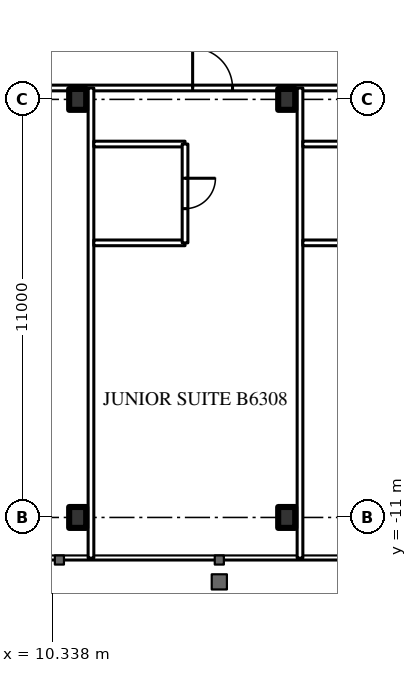
"""IFC4 building model, lengths in metres.
Left out: names, types, materials, properties, quantities, classifications, styles, units other than length and angle.
Written with IfcOpenShell. Run it as: python <this file> out.ifc"""

import sys

from ifc_helpers import new_model, si_unit, direction, frame, frame_2d, origin, origin_2d, place, context, subcontext, project, spatial, rectangle, i_section, extrude, element, fill, save


model = new_model("IFC4")
c1 = context("Model", 3, precision=1e-05, world=origin(), true_north=direction((0.0, 1.0)))
c2 = subcontext(c1, "Body", "Model", "MODEL_VIEW")
j1 = project(units=[si_unit("LENGTHUNIT", "METRE"), si_unit("PLANEANGLEUNIT", "RADIAN")], contexts=[c1])
p1 = place(None, origin())
s1 = spatial("IfcSite", under=j1, at=p1, CompositionType="ELEMENT")
p2 = place(p1, origin())
s2 = spatial("IfcBuilding", under=s1, at=p2, CompositionType="ELEMENT")
p3 = place(p2, frame((0.0, 0.0, 236.9)))
s3 = spatial("IfcBuildingStorey", under=s2, at=p3, CompositionType="ELEMENT", Elevation=236.9)
for number, where, z_axis, x_axis in (
    (1, (11.0, -11.0, 0.0), (0.0, 0.0, 1.0), (1.0, 0.0, 0.0)),
    (2, (16.5, -11.0, 0.0), (0.0, 0.0, 1.0), (1.0, 0.0, 0.0)),
    (3, (11.0, 0.0, 0.0), (0.0, 0.0, 1.0), (1.0, 0.0, 0.0)),
    (4, (16.5, 0.0, 0.0), (0.0, 0.0, 1.0), (1.0, 0.0, 0.0)),
):
    element("IfcColumn", number, at=place(p3, frame(where, z_axis=z_axis, x_axis=x_axis)), inside=s3, PredefinedType="COLUMN", context=c2, shape_type="SweptSolid", body=[
        extrude(i_section(OverallWidth=0.448, OverallDepth=0.55, WebThickness=0.072, FlangeThickness=0.115, FilletRadius=0.02, at=origin_2d()), origin(), (0.0, 0.0, 1.0), 3.6),
    ])
p4 = place(p3, frame((-27.5, 0.3, 0.0), z_axis=(0.0, 0.0, 1.0), x_axis=(1.0, 0.0, 0.0)))
e5 = element("IfcWall", 5, at=p4, inside=s3, PredefinedType="PARTITIONING", context=c2, shape_type="SweptSolid", body=[
    extrude(rectangle(XDim=55.0, YDim=0.15, at=frame_2d((27.5, 0.0))), origin(), (0.0, 0.0, 1.0), 2.4),
])
p5 = place(p4, frame((1.575, 0.0, 0.0)))
e6 = element("IfcOpeningElement", 6, at=p5, cuts=e5, PredefinedType="OPENING", context=c2, shape_type="SweptSolid", body=[
    extrude(rectangle(XDim=1.0, YDim=2.2, at=frame_2d((0.5, 1.1))), frame((0.0, 0.085, 0.0), z_axis=(0.0, -1.0, 0.0), x_axis=(1.0, 0.0, 0.0)), (0.0, 0.0, 1.0), 0.17),
])
p6 = place(p4, frame((8.525, 0.0, 0.0)))
e7 = element("IfcOpeningElement", 7, at=p6, cuts=e5, PredefinedType="OPENING", context=c2, shape_type="SweptSolid", body=[
    extrude(rectangle(XDim=1.05, YDim=2.4, at=frame_2d((0.525, 1.2))), frame((0.0, 0.085, 0.0), z_axis=(0.0, -1.0, 0.0), x_axis=(1.0, 0.0, 0.0)), (0.0, 0.0, 1.0), 0.17),
])
p7 = place(p4, frame((14.025, 0.0, 0.0)))
e8 = element("IfcOpeningElement", 8, at=p7, cuts=e5, PredefinedType="OPENING", context=c2, shape_type="SweptSolid", body=[
    extrude(rectangle(XDim=1.05, YDim=2.4, at=frame_2d((0.525, 1.2))), frame((0.0, 0.085, 0.0), z_axis=(0.0, -1.0, 0.0), x_axis=(1.0, 0.0, 0.0)), (0.0, 0.0, 1.0), 0.17),
])
p8 = place(p4, frame((25.025, 0.0, 0.0)))
e9 = element("IfcOpeningElement", 9, at=p8, cuts=e5, PredefinedType="OPENING", context=c2, shape_type="SweptSolid", body=[
    extrude(rectangle(XDim=1.05, YDim=2.4, at=frame_2d((0.525, 1.2))), frame((0.0, 0.085, 0.0), z_axis=(0.0, -1.0, 0.0), x_axis=(1.0, 0.0, 0.0)), (0.0, 0.0, 1.0), 0.17),
])
p9 = place(p4, frame((30.525, 0.0, 0.0)))
e10 = element("IfcOpeningElement", 10, at=p9, cuts=e5, PredefinedType="OPENING", context=c2, shape_type="SweptSolid", body=[
    extrude(rectangle(XDim=1.05, YDim=2.4, at=frame_2d((0.525, 1.2))), frame((0.0, 0.085, 0.0), z_axis=(0.0, -1.0, 0.0), x_axis=(1.0, 0.0, 0.0)), (0.0, 0.0, 1.0), 0.17),
])
p10 = place(p4, frame((41.525, 0.0, 0.0)))
e11 = element("IfcOpeningElement", 11, at=p10, cuts=e5, PredefinedType="OPENING", context=c2, shape_type="SweptSolid", body=[
    extrude(rectangle(XDim=1.05, YDim=2.4, at=frame_2d((0.525, 1.2))), frame((0.0, 0.085, 0.0), z_axis=(0.0, -1.0, 0.0), x_axis=(1.0, 0.0, 0.0)), (0.0, 0.0, 1.0), 0.17),
])
p11 = place(p4, frame((47.025, 0.0, 0.0)))
e12 = element("IfcOpeningElement", 12, at=p11, cuts=e5, PredefinedType="OPENING", context=c2, shape_type="SweptSolid", body=[
    extrude(rectangle(XDim=1.05, YDim=2.4, at=frame_2d((0.525, 1.2))), frame((0.0, 0.085, 0.0), z_axis=(0.0, -1.0, 0.0), x_axis=(1.0, 0.0, 0.0)), (0.0, 0.0, 1.0), 0.17),
])
p12 = place(p4, frame((52.525, 0.0, 0.0)))
e13 = element("IfcOpeningElement", 13, at=p12, cuts=e5, PredefinedType="OPENING", context=c2, shape_type="SweptSolid", body=[
    extrude(rectangle(XDim=1.05, YDim=2.4, at=frame_2d((0.525, 1.2))), frame((0.0, 0.085, 0.0), z_axis=(0.0, -1.0, 0.0), x_axis=(1.0, 0.0, 0.0)), (0.0, 0.0, 1.0), 0.17),
])
for number, where, z_axis, x_axis in (
    (14, (11.35, -12.07, 0.0), (0.0, 0.0, 1.0), (0.0, 1.0, 0.0)),
    (15, (16.85, -12.07, 0.0), (0.0, 0.0, 1.0), (0.0, 1.0, 0.0)),
):
    element("IfcWall", number, at=place(p3, frame(where, z_axis=z_axis, x_axis=x_axis)), inside=s3, PredefinedType="PARTITIONING", context=c2, shape_type="SweptSolid", body=[
        extrude(rectangle(XDim=12.37, YDim=0.15, at=frame_2d((6.185, 0.0))), origin(), (0.0, 0.0, 1.0), 3.4),
    ])
for number, where, z_axis, x_axis in (
    (16, (11.425, -3.775, 0.0), (0.0, 0.0, 1.0), (1.0, 0.0, 0.0)),
    (17, (11.425, -1.175, 0.0), (0.0, 0.0, 1.0), (1.0, 0.0, 0.0)),
):
    element("IfcWall", number, at=place(p3, frame(where, z_axis=z_axis, x_axis=x_axis)), inside=s3, PredefinedType="PARTITIONING", context=c2, shape_type="SweptSolid", body=[
        extrude(rectangle(XDim=2.4, YDim=0.15, at=frame_2d((1.2, 0.0))), origin(), (0.0, 0.0, 1.0), 3.4),
    ])
p13 = place(p3, frame((13.825, -3.775, 0.0), z_axis=(0.0, 0.0, 1.0), x_axis=(0.0, 1.0, 0.0)))
e18 = element("IfcWall", 18, at=p13, inside=s3, PredefinedType="PARTITIONING", context=c2, shape_type="SweptSolid", body=[
    extrude(rectangle(XDim=2.6, YDim=0.15, at=frame_2d((1.3, 0.0))), origin(), (0.0, 0.0, 1.0), 3.4),
])
p14 = place(p13, frame((0.9, 0.0, 0.0)))
e19 = element("IfcOpeningElement", 19, at=p14, cuts=e18, PredefinedType="OPENING", context=c2, shape_type="SweptSolid", body=[
    extrude(rectangle(XDim=0.8, YDim=2.2, at=frame_2d((0.4, 1.1))), frame((0.0, 0.085, 0.0), z_axis=(0.0, -1.0, 0.0), x_axis=(1.0, 0.0, 0.0)), (0.0, 0.0, 1.0), 0.17),
])
for number, where, z_axis, x_axis in (
    (20, (16.925, -3.775, 0.0), (0.0, 0.0, 1.0), (1.0, 0.0, 0.0)),
    (21, (16.925, -1.175, 0.0), (0.0, 0.0, 1.0), (1.0, 0.0, 0.0)),
):
    element("IfcWall", number, at=place(p3, frame(where, z_axis=z_axis, x_axis=x_axis)), inside=s3, PredefinedType="PARTITIONING", context=c2, shape_type="SweptSolid", body=[
        extrude(rectangle(XDim=2.4, YDim=0.15, at=frame_2d((1.2, 0.0))), origin(), (0.0, 0.0, 1.0), 3.4),
    ])
p15 = place(p14, origin())
e22 = element("IfcDoor", 22, at=p15, inside=s3, OperationType="SINGLE_SWING_RIGHT", PredefinedType="DOOR", context=c2, shape_type="SweptSolid", body=[
    extrude(rectangle(XDim=0.8, YDim=2.2, at=frame_2d((0.4, 1.1))), frame((0.0, 0.025, 0.0), z_axis=(0.0, -1.0, 0.0), x_axis=(1.0, 0.0, 0.0)), (0.0, 0.0, 1.0), 0.05),
])
fill(e19, e22)
p16 = place(p10, origin())
e23 = element("IfcDoor", 23, at=p16, inside=s3, OperationType="SINGLE_SWING_LEFT", PredefinedType="DOOR", context=c2, shape_type="SweptSolid", body=[
    extrude(rectangle(XDim=1.05, YDim=2.4, at=frame_2d((0.525, 1.2))), frame((0.0, 0.025, 0.0), z_axis=(0.0, -1.0, 0.0), x_axis=(1.0, 0.0, 0.0)), (0.0, 0.0, 1.0), 0.05),
])
fill(e11, e23)
save(model, sys.argv[1])
